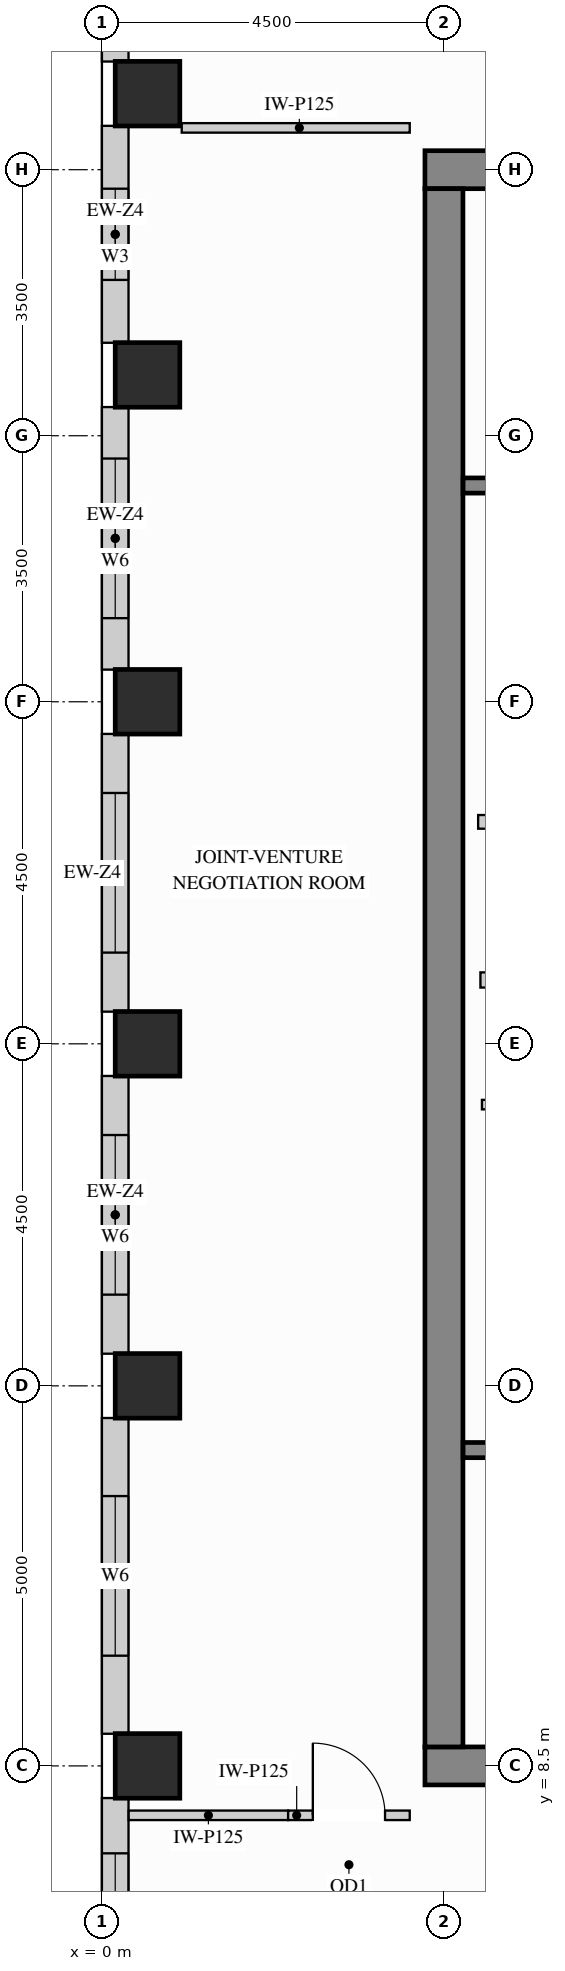
"""IFC4 building model, lengths in metres.
Left out: names, types, materials, properties, quantities, classifications, styles, units other than length and angle.
Written with IfcOpenShell. Run it as: python <this file> out.ifc"""

import sys

from ifc_helpers import new_model, si_unit, direction, frame, frame_2d, origin, origin_2d, place, context, subcontext, project, spatial, rectangle, extrude, source, transform, mapped, element, fill, save


model = new_model("IFC4")
c1 = context("Model", 3, precision=1e-05, world=origin(), true_north=direction((0.0, 1.0)))
c2 = subcontext(c1, "Body", "Model", "MODEL_VIEW")
j1 = project(units=[si_unit("LENGTHUNIT", "METRE"), si_unit("PLANEANGLEUNIT", "RADIAN")], contexts=[c1])
p1 = place(None, origin())
s1 = spatial("IfcSite", under=j1, at=p1, CompositionType="ELEMENT")
p2 = place(p1, origin())
s2 = spatial("IfcBuilding", under=s1, at=p2, CompositionType="ELEMENT")
p3 = place(p2, frame((0.0, 0.0, 270.0)))
s3 = spatial("IfcBuildingStorey", under=s2, at=p3, CompositionType="ELEMENT", Elevation=270.0)
m1 = source(origin(), c2, "Body", "SweptSolid", [
    extrude(rectangle(XDim=0.85, YDim=0.85, at=origin_2d()), origin(), (0.0, 0.0, 1.0), 3.4),
])
for number, where, z_axis, x_axis in (
    (1, (0.6, 13.5, 0.0), (0.0, 0.0, 1.0), (1.0, 0.0, 0.0)),
    (2, (0.6, 18.0, 0.0), (0.0, 0.0, 1.0), (1.0, 0.0, 0.0)),
    (3, (0.6, 22.5, 0.0), (0.0, 0.0, 1.0), (1.0, 0.0, 0.0)),
    (4, (0.6, 26.8, 0.0), (0.0, 0.0, 1.0), (1.0, 0.0, 0.0)),
    (5, (0.6, 30.5, 0.0), (0.0, 0.0, 1.0), (1.0, 0.0, 0.0)),
    (6, (0.6, 8.5, 0.0), (0.0, 0.0, 1.0), (1.0, 0.0, 0.0)),
):
    element("IfcColumn", number, at=place(p3, frame(where, z_axis=z_axis, x_axis=x_axis)), inside=s3, PredefinedType="COLUMN", context=c2, shape_type="MappedRepresentation", body=[
        mapped(m1, transform((0.0, 0.0, 0.0), x_axis=(1.0, 0.0, 0.0), y_axis=(0.0, 1.0, 0.0), z_axis=(0.0, 0.0, 1.0))),
    ])
m2 = source(origin(), c2, "Body", "SweptSolid", [
    extrude(rectangle(XDim=10.5, YDim=0.5, at=frame_2d((5.25, 0.0))), origin(), (0.0, 0.0, 1.0), 3.4),
])
for number, where, z_axis, x_axis in (
    (7, (4.25, 29.5, 0.0), (0.0, 0.0, 1.0), (1.0, 0.0, 0.0)),
    (8, (4.25, 8.5, 0.0), (0.0, 0.0, 1.0), (1.0, 0.0, 0.0)),
):
    element("IfcWall", number, at=place(p3, frame(where, z_axis=z_axis, x_axis=x_axis)), inside=s3, PredefinedType="SHEAR", context=c2, shape_type="MappedRepresentation", body=[
        mapped(m2, transform((0.0, 0.0, 0.0), x_axis=(1.0, 0.0, 0.0), y_axis=(0.0, 1.0, 0.0), z_axis=(0.0, 0.0, 1.0))),
    ])
m3 = source(origin(), c2, "Body", "SweptSolid", [
    extrude(rectangle(XDim=20.5, YDim=0.5, at=frame_2d((10.25, 0.0))), origin(), (0.0, 0.0, 1.0), 3.4),
])
p4 = place(p3, frame((4.5, 8.75, 0.0), z_axis=(0.0, 0.0, 1.0), x_axis=(0.0, 1.0, 0.0)))
e9 = element("IfcWall", 9, at=p4, inside=s3, PredefinedType="SHEAR", context=c2, shape_type="MappedRepresentation", body=[
    mapped(m3, transform((0.0, 0.0, 0.0), x_axis=(1.0, 0.0, 0.0), y_axis=(0.0, 1.0, 0.0), z_axis=(0.0, 0.0, 1.0))),
])
m4 = source(origin(), c2, "Body", "SweptSolid", [
    extrude(rectangle(XDim=0.527, YDim=0.35, at=frame_2d((0.263, 0.0))), origin(), (0.0, 0.0, 1.0), 3.385),
])
p5 = place(p3, frame((0.175, 31.45, 0.0), z_axis=(0.0, 0.0, 1.0), x_axis=(0.0, -1.0, 0.0)))
e10 = element("IfcWall", 10, at=p5, inside=s3, PredefinedType="SOLIDWALL", context=c2, shape_type="MappedRepresentation", body=[
    mapped(m4, transform((0.0, 0.0, 0.0), x_axis=(1.0, 0.0, 0.0), y_axis=(0.0, 1.0, 0.0), z_axis=(0.0, 0.0, 1.0))),
])
p6 = place(p3, frame((0.175, 30.077, 0.0), z_axis=(0.0, 0.0, 1.0), x_axis=(0.0, -1.0, 0.0)))
e11 = element("IfcWall", 11, at=p6, inside=s3, PredefinedType="SOLIDWALL", context=c2, shape_type="SweptSolid", body=[
    extrude(rectangle(XDim=2.854, YDim=0.35, at=frame_2d((1.427, 0.0))), origin(), (0.0, 0.0, 1.0), 3.385),
])
p7 = place(p6, frame((0.827, 0.0, 0.78)))
e12 = element("IfcOpeningElement", 12, at=p7, cuts=e11, PredefinedType="OPENING", context=c2, shape_type="SweptSolid", body=[
    extrude(rectangle(XDim=1.2, YDim=2.25, at=frame_2d((0.6, 1.125))), frame((0.0, 0.185, 0.0), z_axis=(0.0, -1.0, 0.0), x_axis=(1.0, 0.0, 0.0)), (0.0, 0.0, 1.0), 0.37),
])
p8 = place(p3, frame((0.175, 26.377, 0.0), z_axis=(0.0, 0.0, 1.0), x_axis=(0.0, -1.0, 0.0)))
e13 = element("IfcWall", 13, at=p8, inside=s3, PredefinedType="SOLIDWALL", context=c2, shape_type="SweptSolid", body=[
    extrude(rectangle(XDim=3.454, YDim=0.35, at=frame_2d((1.727, 0.0))), origin(), (0.0, 0.0, 1.0), 3.385),
])
p9 = place(p8, frame((0.677, 0.0, 0.78)))
e14 = element("IfcOpeningElement", 14, at=p9, cuts=e13, PredefinedType="OPENING", context=c2, shape_type="SweptSolid", body=[
    extrude(rectangle(XDim=2.1, YDim=2.25, at=frame_2d((1.05, 1.125))), frame((0.0, 0.185, 0.0), z_axis=(0.0, -1.0, 0.0), x_axis=(1.0, 0.0, 0.0)), (0.0, 0.0, 1.0), 0.37),
])
p10 = place(p3, frame((0.175, 22.077, 0.0), z_axis=(0.0, 0.0, 1.0), x_axis=(0.0, -1.0, 0.0)))
e15 = element("IfcWall", 15, at=p10, inside=s3, PredefinedType="SOLIDWALL", context=c2, shape_type="SweptSolid", body=[
    extrude(rectangle(XDim=3.654, YDim=0.35, at=frame_2d((1.827, 0.0))), origin(), (0.0, 0.0, 1.0), 3.385),
])
p11 = place(p10, frame((0.777, 0.0, 0.78)))
e16 = element("IfcOpeningElement", 16, at=p11, cuts=e15, PredefinedType="OPENING", context=c2, shape_type="SweptSolid", body=[
    extrude(rectangle(XDim=2.1, YDim=2.25, at=frame_2d((1.05, 1.125))), frame((0.0, 0.185, 0.0), z_axis=(0.0, -1.0, 0.0), x_axis=(1.0, 0.0, 0.0)), (0.0, 0.0, 1.0), 0.37),
])
p12 = place(p3, frame((0.175, 17.577, 0.0), z_axis=(0.0, 0.0, 1.0), x_axis=(0.0, -1.0, 0.0)))
e17 = element("IfcWall", 17, at=p12, inside=s3, PredefinedType="SOLIDWALL", context=c2, shape_type="SweptSolid", body=[
    extrude(rectangle(XDim=3.654, YDim=0.35, at=frame_2d((1.827, 0.0))), origin(), (0.0, 0.0, 1.0), 3.385),
])
p13 = place(p12, frame((0.777, 0.0, 0.78)))
e18 = element("IfcOpeningElement", 18, at=p13, cuts=e17, PredefinedType="OPENING", context=c2, shape_type="SweptSolid", body=[
    extrude(rectangle(XDim=2.1, YDim=2.25, at=frame_2d((1.05, 1.125))), frame((0.0, 0.185, 0.0), z_axis=(0.0, -1.0, 0.0), x_axis=(1.0, 0.0, 0.0)), (0.0, 0.0, 1.0), 0.37),
])
p14 = place(p3, frame((0.175, 13.077, 0.0), z_axis=(0.0, 0.0, 1.0), x_axis=(0.0, -1.0, 0.0)))
e19 = element("IfcWall", 19, at=p14, inside=s3, PredefinedType="SOLIDWALL", context=c2, shape_type="SweptSolid", body=[
    extrude(rectangle(XDim=4.154, YDim=0.35, at=frame_2d((2.077, 0.0))), origin(), (0.0, 0.0, 1.0), 3.385),
])
p15 = place(p14, frame((1.027, 0.0, 0.78)))
e20 = element("IfcOpeningElement", 20, at=p15, cuts=e19, PredefinedType="OPENING", context=c2, shape_type="SweptSolid", body=[
    extrude(rectangle(XDim=2.1, YDim=2.25, at=frame_2d((1.05, 1.125))), frame((0.0, 0.185, 0.0), z_axis=(0.0, -1.0, 0.0), x_axis=(1.0, 0.0, 0.0)), (0.0, 0.0, 1.0), 0.37),
])
p16 = place(p3, frame((0.175, 8.077, 0.0), z_axis=(0.0, 0.0, 1.0), x_axis=(0.0, -1.0, 0.0)))
e21 = element("IfcWall", 21, at=p16, inside=s3, PredefinedType="SOLIDWALL", context=c2, shape_type="SweptSolid", body=[
    extrude(rectangle(XDim=4.154, YDim=0.35, at=frame_2d((2.077, 0.0))), origin(), (0.0, 0.0, 1.0), 3.385),
])
p17 = place(p16, frame((0.727, 0.0, 0.78)))
e22 = element("IfcOpeningElement", 22, at=p17, cuts=e21, PredefinedType="OPENING", context=c2, shape_type="SweptSolid", body=[
    extrude(rectangle(XDim=2.1, YDim=2.25, at=frame_2d((1.05, 1.125))), frame((0.0, 0.185, 0.0), z_axis=(0.0, -1.0, 0.0), x_axis=(1.0, 0.0, 0.0)), (0.0, 0.0, 1.0), 0.37),
])
m5 = source(origin(), c2, "Body", "SweptSolid", [
    extrude(rectangle(XDim=2.2, YDim=0.18, at=frame_2d((1.1, 0.0))), origin(), (0.0, 0.0, 1.0), 3.385),
])
p18 = place(p3, frame((4.95, 20.92, 0.0), z_axis=(0.0, 0.0, 1.0), x_axis=(1.0, 0.0, 0.0)))
e23 = element("IfcWall", 23, at=p18, inside=s3, PredefinedType="PARTITIONING", context=c2, shape_type="MappedRepresentation", body=[
    mapped(m5, transform((0.0, 0.0, 0.0), x_axis=(1.0, 0.0, 0.0), y_axis=(0.0, 1.0, 0.0), z_axis=(0.0, 0.0, 1.0))),
])
p19 = place(p3, frame((5.0, 17.2, 0.0), z_axis=(0.0, 0.0, 1.0), x_axis=(1.0, 0.0, 0.0)))
e24 = element("IfcWall", 24, at=p19, inside=s3, PredefinedType="PARTITIONING", context=c2, shape_type="SweptSolid", body=[
    extrude(rectangle(XDim=2.4, YDim=0.125, at=frame_2d((1.2, 0.0))), origin(), (0.0, 0.0, 1.0), 3.385),
])
p20 = place(p19, frame((0.7, 0.0, 0.0)))
e25 = element("IfcOpeningElement", 25, at=p20, cuts=e24, PredefinedType="OPENING", context=c2, shape_type="SweptSolid", body=[
    extrude(rectangle(XDim=0.85, YDim=2.1, at=frame_2d((0.425, 1.05))), frame((0.0, 0.073, 0.0), z_axis=(0.0, -1.0, 0.0), x_axis=(1.0, 0.0, 0.0)), (0.0, 0.0, 1.0), 0.145),
])
m6 = source(origin(), c2, "Body", "SweptSolid", [
    extrude(rectangle(XDim=3.0, YDim=0.125, at=frame_2d((1.5, 0.0))), origin(), (0.0, 0.0, 1.0), 3.385),
])
p21 = place(p3, frame((1.05, 30.05, 0.0), z_axis=(0.0, 0.0, 1.0), x_axis=(1.0, 0.0, 0.0)))
e26 = element("IfcWall", 26, at=p21, inside=s3, PredefinedType="PARTITIONING", context=c2, shape_type="MappedRepresentation", body=[
    mapped(m6, transform((0.0, 0.0, 0.0), x_axis=(1.0, 0.0, 0.0), y_axis=(0.0, 1.0, 0.0), z_axis=(0.0, 0.0, 1.0))),
])
m7 = source(origin(), c2, "Body", "SweptSolid", [
    extrude(rectangle(XDim=2.098, YDim=0.125, at=frame_2d((1.049, 0.0))), origin(), (0.0, 0.0, 1.0), 3.385),
])
p22 = place(p3, frame((0.352, 7.85, 0.0), z_axis=(0.0, 0.0, 1.0), x_axis=(1.0, 0.0, 0.0)))
e27 = element("IfcWall", 27, at=p22, inside=s3, PredefinedType="PARTITIONING", context=c2, shape_type="MappedRepresentation", body=[
    mapped(m7, transform((0.0, 0.0, 0.0), x_axis=(1.0, 0.0, 0.0), y_axis=(0.0, 1.0, 0.0), z_axis=(0.0, 0.0, 1.0))),
])
p23 = place(p3, frame((2.45, 7.85, 0.0), z_axis=(0.0, 0.0, 1.0), x_axis=(1.0, 0.0, 0.0)))
e28 = element("IfcWall", 28, at=p23, inside=s3, PredefinedType="PARTITIONING", context=c2, shape_type="SweptSolid", body=[
    extrude(rectangle(XDim=1.6, YDim=0.125, at=frame_2d((0.8, 0.0))), origin(), (0.0, 0.0, 1.0), 3.385),
])
p24 = place(p23, frame((0.325, 0.0, 0.0)))
e29 = element("IfcOpeningElement", 29, at=p24, cuts=e28, PredefinedType="OPENING", context=c2, shape_type="SweptSolid", body=[
    extrude(rectangle(XDim=0.95, YDim=2.15, at=frame_2d((0.475, 1.075))), frame((0.0, 0.073, 0.0), z_axis=(0.0, -1.0, 0.0), x_axis=(1.0, 0.0, 0.0)), (0.0, 0.0, 1.0), 0.145),
])
m8 = source(origin(), c2, "Body", "SweptSolid", [
    extrude(rectangle(XDim=2.09, YDim=0.2, at=frame_2d((1.045, 0.0))), origin(), (0.0, 0.0, 1.0), 3.385),
])
p25 = place(p3, frame((4.98, 18.84, 0.0), z_axis=(0.0, 0.0, 1.0), x_axis=(1.0, 0.0, 0.0)))
e30 = element("IfcWall", 30, at=p25, inside=s3, PredefinedType="PARTITIONING", context=c2, shape_type="MappedRepresentation", body=[
    mapped(m8, transform((0.0, 0.0, 0.0), x_axis=(1.0, 0.0, 0.0), y_axis=(0.0, 1.0, 0.0), z_axis=(0.0, 0.0, 1.0))),
])
p26 = place(p3, frame((4.752, 12.655, 0.0), z_axis=(0.0, 0.0, 1.0), x_axis=(1.0, 0.0, 0.0)))
e31 = element("IfcWall", 31, at=p26, inside=s3, PredefinedType="SHEAR", context=c2, shape_type="SweptSolid", body=[
    extrude(rectangle(XDim=7.653, YDim=0.2, at=frame_2d((3.827, 0.0))), origin(), (0.0, 0.0, 1.0), 3.4),
])
p27 = place(p26, frame((0.4, 0.0, 0.0)))
e32 = element("IfcOpeningElement", 32, at=p27, cuts=e31, PredefinedType="OPENING", context=c2, shape_type="SweptSolid", body=[
    extrude(rectangle(XDim=1.1, YDim=2.15, at=frame_2d((0.55, 1.075))), frame((0.0, 0.11, 0.0), z_axis=(0.0, -1.0, 0.0), x_axis=(1.0, 0.0, 0.0)), (0.0, 0.0, 1.0), 0.22),
])
p28 = place(p3, frame((4.752, 25.345, 0.0), z_axis=(0.0, 0.0, 1.0), x_axis=(1.0, 0.0, 0.0)))
e33 = element("IfcWall", 33, at=p28, inside=s3, PredefinedType="SHEAR", context=c2, shape_type="SweptSolid", body=[
    extrude(rectangle(XDim=7.653, YDim=0.2, at=frame_2d((3.827, 0.0))), origin(), (0.0, 0.0, 1.0), 3.4),
])
p29 = place(p28, frame((0.4, 0.0, 0.0)))
e34 = element("IfcOpeningElement", 34, at=p29, cuts=e33, PredefinedType="OPENING", context=c2, shape_type="SweptSolid", body=[
    extrude(rectangle(XDim=1.1, YDim=2.15, at=frame_2d((0.55, 1.075))), frame((0.0, 0.11, 0.0), z_axis=(0.0, -1.0, 0.0), x_axis=(1.0, 0.0, 0.0)), (0.0, 0.0, 1.0), 0.22),
])
m9 = source(origin(), c2, "Body", "SweptSolid", [
    extrude(rectangle(XDim=0.95, YDim=2.15, at=frame_2d((0.475, 1.075))), frame((0.0, 0.025, 0.0), z_axis=(0.0, -1.0, 0.0), x_axis=(1.0, 0.0, 0.0)), (0.0, 0.0, 1.0), 0.05),
])
p30 = place(p24, origin())
e35 = element("IfcDoor", 35, at=p30, inside=s3, OperationType="SINGLE_SWING_LEFT", PredefinedType="DOOR", context=c2, shape_type="MappedRepresentation", body=[
    mapped(m9, transform((0.0, 0.0, 0.0), x_axis=(1.0, 0.0, 0.0), y_axis=(0.0, 1.0, 0.0), z_axis=(0.0, 0.0, 1.0))),
])
fill(e29, e35)
m10 = source(origin(), c2, "Body", "SweptSolid", [
    extrude(rectangle(XDim=1.2, YDim=2.25, at=frame_2d((0.6, 1.125))), frame((0.0, 0.03, 0.0), z_axis=(0.0, -1.0, 0.0), x_axis=(1.0, 0.0, 0.0)), (0.0, 0.0, 1.0), 0.06),
])
p31 = place(p7, origin())
e36 = element("IfcWindow", 36, at=p31, inside=s3, PartitioningType="SINGLE_PANEL", PredefinedType="WINDOW", context=c2, shape_type="MappedRepresentation", body=[
    mapped(m10, transform((0.0, 0.0, 0.0), x_axis=(1.0, 0.0, 0.0), y_axis=(0.0, 1.0, 0.0), z_axis=(0.0, 0.0, 1.0))),
])
fill(e12, e36)
m11 = source(origin(), c2, "Body", "SweptSolid", [
    extrude(rectangle(XDim=2.1, YDim=2.25, at=frame_2d((1.05, 1.125))), frame((0.0, 0.03, 0.0), z_axis=(0.0, -1.0, 0.0), x_axis=(1.0, 0.0, 0.0)), (0.0, 0.0, 1.0), 0.06),
])
p32 = place(p9, origin())
e37 = element("IfcWindow", 37, at=p32, inside=s3, PartitioningType="SINGLE_PANEL", PredefinedType="WINDOW", context=c2, shape_type="MappedRepresentation", body=[
    mapped(m11, transform((0.0, 0.0, 0.0), x_axis=(1.0, 0.0, 0.0), y_axis=(0.0, 1.0, 0.0), z_axis=(0.0, 0.0, 1.0))),
])
fill(e14, e37)
p33 = place(p11, origin())
e38 = element("IfcWindow", 38, at=p33, inside=s3, PartitioningType="SINGLE_PANEL", PredefinedType="WINDOW", context=c2, shape_type="MappedRepresentation", body=[
    mapped(m11, transform((0.0, 0.0, 0.0), x_axis=(1.0, 0.0, 0.0), y_axis=(0.0, 1.0, 0.0), z_axis=(0.0, 0.0, 1.0))),
])
fill(e16, e38)
p34 = place(p13, origin())
e39 = element("IfcWindow", 39, at=p34, inside=s3, PartitioningType="SINGLE_PANEL", PredefinedType="WINDOW", context=c2, shape_type="MappedRepresentation", body=[
    mapped(m11, transform((0.0, 0.0, 0.0), x_axis=(1.0, 0.0, 0.0), y_axis=(0.0, 1.0, 0.0), z_axis=(0.0, 0.0, 1.0))),
])
fill(e18, e39)
p35 = place(p15, origin())
e40 = element("IfcWindow", 40, at=p35, inside=s3, PartitioningType="SINGLE_PANEL", PredefinedType="WINDOW", context=c2, shape_type="MappedRepresentation", body=[
    mapped(m11, transform((0.0, 0.0, 0.0), x_axis=(1.0, 0.0, 0.0), y_axis=(0.0, 1.0, 0.0), z_axis=(0.0, 0.0, 1.0))),
])
fill(e20, e40)
p36 = place(p17, origin())
e41 = element("IfcWindow", 41, at=p36, inside=s3, PartitioningType="SINGLE_PANEL", PredefinedType="WINDOW", context=c2, shape_type="MappedRepresentation", body=[
    mapped(m11, transform((0.0, 0.0, 0.0), x_axis=(1.0, 0.0, 0.0), y_axis=(0.0, 1.0, 0.0), z_axis=(0.0, 0.0, 1.0))),
])
fill(e22, e41)
save(model, sys.argv[1])
